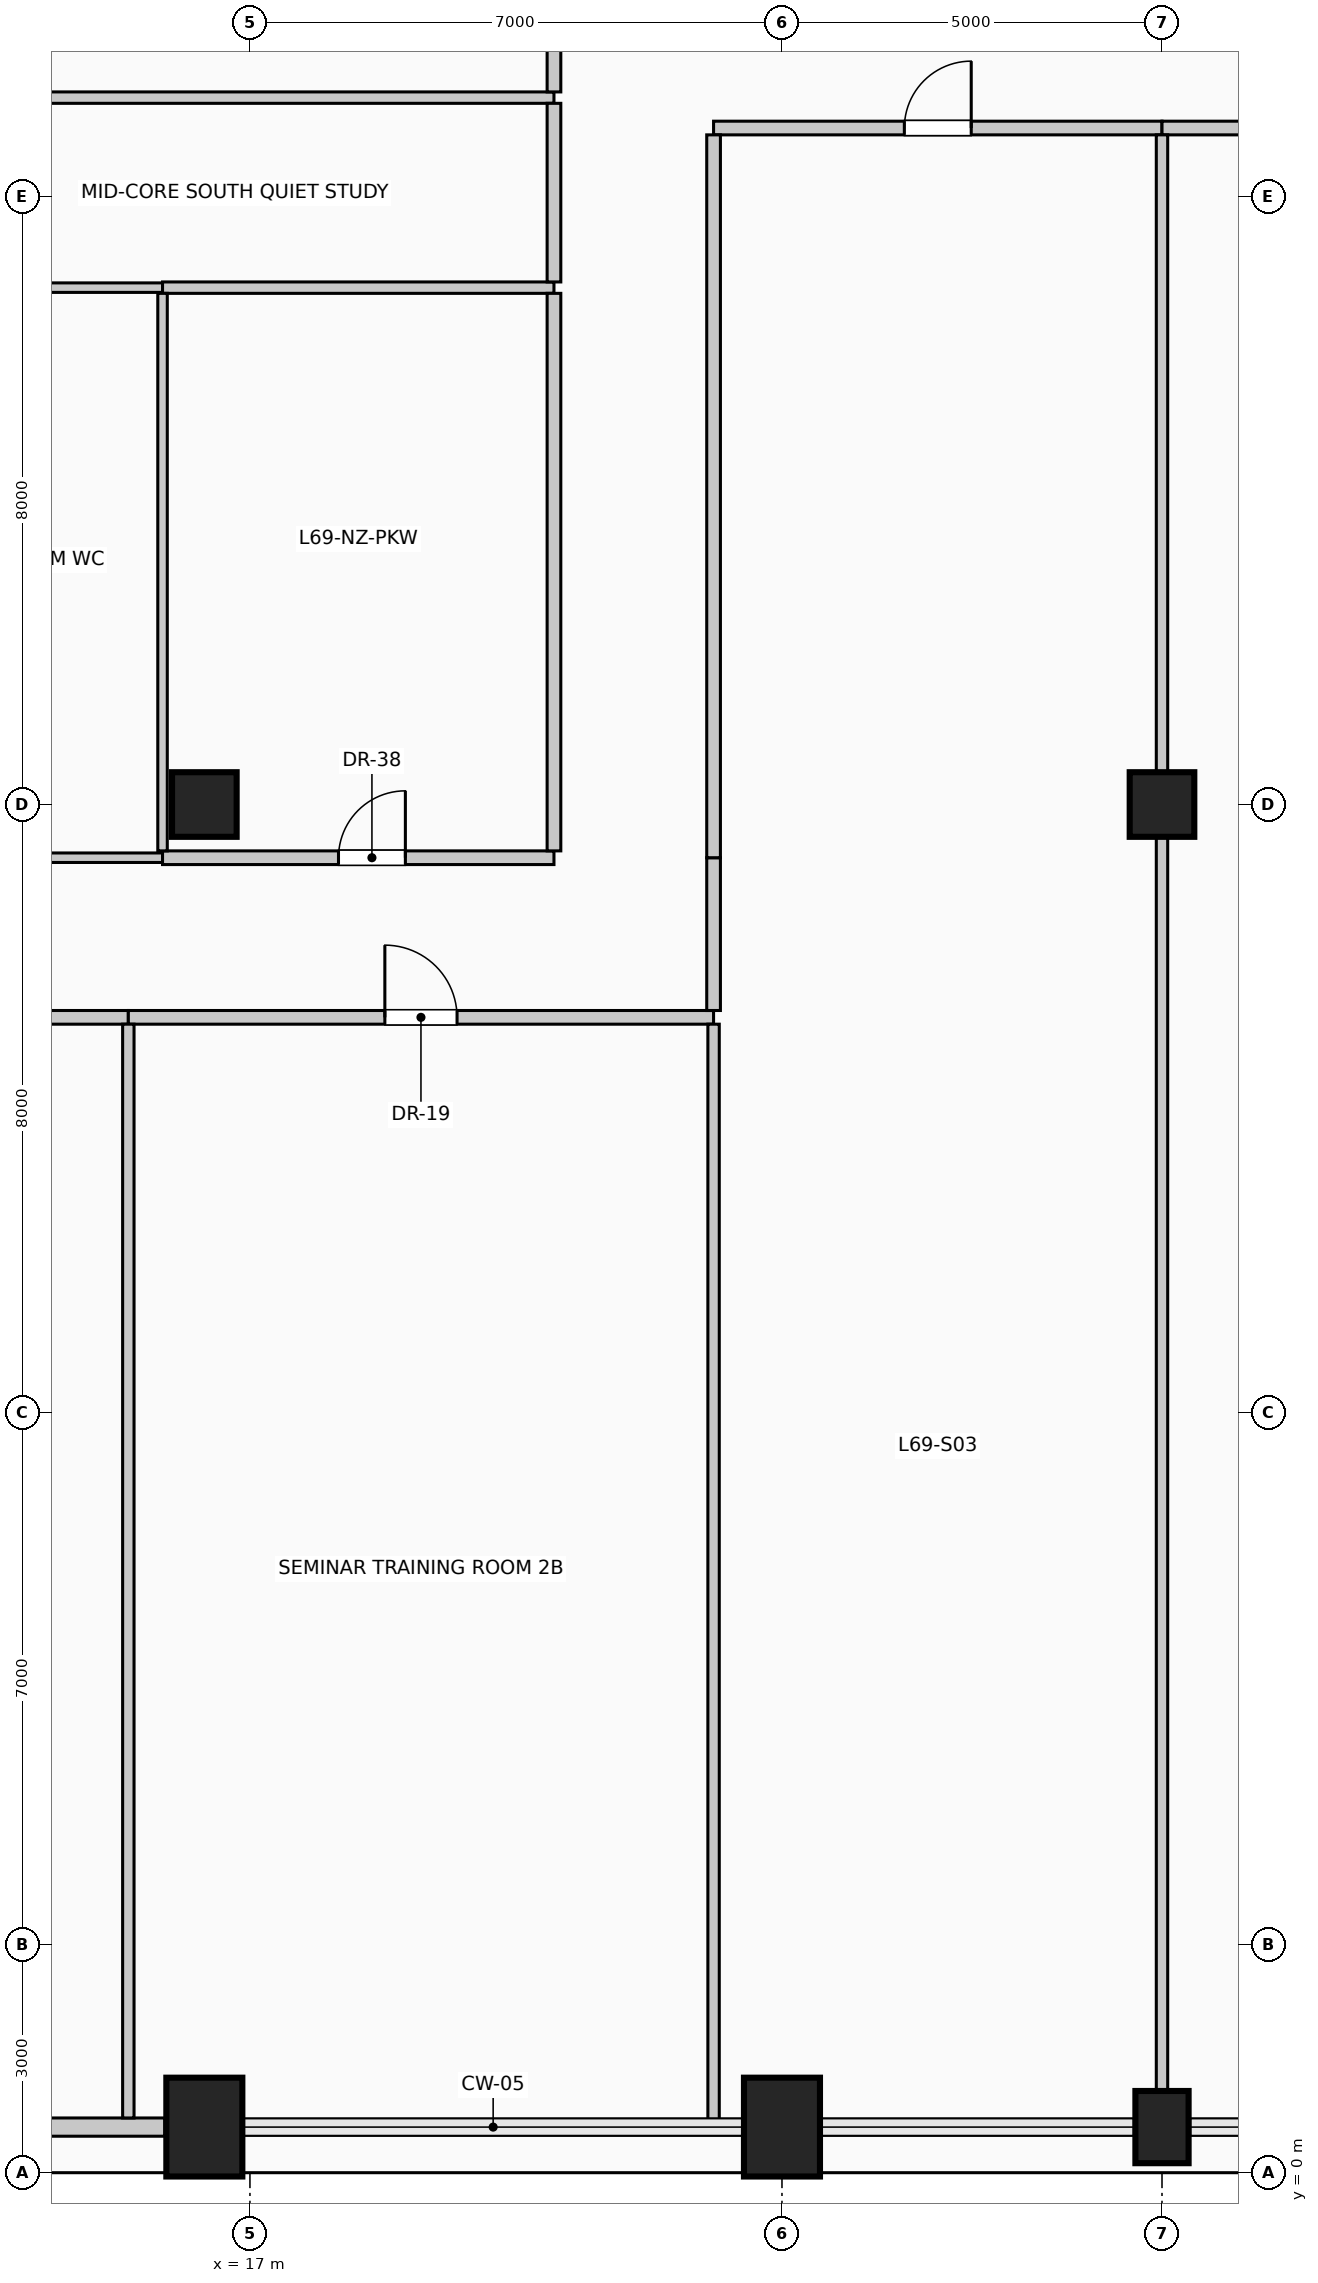
"""IFC4 building model, lengths in metres.
Left out: names, types, materials, properties, quantities, classifications, styles, units other than length and angle.
Written with IfcOpenShell. Run it as: python <this file> out.ifc"""

import sys

from ifc_helpers import new_model, si_unit, direction, frame, frame_2d, origin, origin_2d, place, context, subcontext, project, spatial, rectangle, circle, extrude, element, fill, save


model = new_model("IFC4")
c1 = context("Model", 3, precision=1e-05, world=origin(), true_north=direction((0.0, 1.0)))
c2 = subcontext(c1, "Body", "Model", "MODEL_VIEW")
j1 = project(units=[si_unit("LENGTHUNIT", "METRE"), si_unit("PLANEANGLEUNIT", "RADIAN")], contexts=[c1])
p1 = place(None, origin())
s1 = spatial("IfcSite", under=j1, at=p1, CompositionType="ELEMENT")
p2 = place(p1, origin())
s2 = spatial("IfcBuilding", under=s1, at=p2, CompositionType="ELEMENT")
p3 = place(p2, frame((0.0, 0.0, 285.0)))
s3 = spatial("IfcBuildingStorey", under=s2, at=p3, CompositionType="ELEMENT", Elevation=285.0)
for number, where, z_axis, x_axis in (
    (1, (16.4, 0.6, 0.0), (0.0, 0.0, 1.0), (1.0, 0.0, 0.0)),
    (2, (24.0, 0.6, 0.0), (0.0, 0.0, 1.0), (1.0, 0.0, 0.0)),
):
    element("IfcColumn", number, at=place(p3, frame(where, z_axis=z_axis, x_axis=x_axis)), inside=s3, PredefinedType="COLUMN", context=c2, shape_type="SweptSolid", body=[
        extrude(rectangle(XDim=1.0, YDim=1.3, at=origin_2d()), origin(), (0.0, 0.0, 1.0), 4.0),
    ])
p4 = place(p3, frame((29.0, 0.6, 0.0), z_axis=(0.0, 0.0, 1.0), x_axis=(1.0, 0.0, 0.0)))
e3 = element("IfcColumn", 3, at=p4, inside=s3, PredefinedType="COLUMN", context=c2, shape_type="SweptSolid", body=[
    extrude(rectangle(XDim=0.7, YDim=0.95, at=origin_2d()), origin(), (0.0, 0.0, 1.0), 4.0),
])
for number, where, z_axis, x_axis in (
    (4, (16.4, 18.0, 0.0), (0.0, 0.0, 1.0), (1.0, 0.0, 0.0)),
    (5, (29.0, 18.0, 0.0), (0.0, 0.0, 1.0), (1.0, 0.0, 0.0)),
):
    element("IfcColumn", number, at=place(p3, frame(where, z_axis=z_axis, x_axis=x_axis)), inside=s3, PredefinedType="COLUMN", context=c2, shape_type="SweptSolid", body=[
        extrude(circle(Radius=0.425, at=origin_2d()), origin(), (0.0, 0.0, 1.0), 4.0),
    ])
p5 = place(p3, frame((15.88, 0.6, 0.0), z_axis=(0.0, 0.0, 1.0), x_axis=(-1.0, 0.0, 0.0)))
e6 = element("IfcWall", 6, at=p5, inside=s3, PredefinedType="SOLIDWALL", context=c2, shape_type="SweptSolid", body=[
    extrude(rectangle(XDim=1.51, YDim=0.24, at=frame_2d((0.755, 0.0))), origin(), (0.0, 0.0, 1.0), 3.025),
])
p6 = place(p3, frame((8.84, 15.2, 0.0), z_axis=(0.0, 0.0, 1.0), x_axis=(1.0, 0.0, 0.0)))
e7 = element("IfcWall", 7, at=p6, inside=s3, PredefinedType="PARTITIONING", context=c2, shape_type="SweptSolid", body=[
    extrude(rectangle(XDim=6.56, YDim=0.18, at=frame_2d((3.28, 0.0))), origin(), (0.0, 0.0, 1.0), 3.775),
])
p7 = place(p6, frame((2.755, 0.0, 0.0)))
e8 = element("IfcOpeningElement", 8, at=p7, cuts=e7, PredefinedType="OPENING", context=c2, shape_type="SweptSolid", body=[
    extrude(rectangle(XDim=1.05, YDim=2.15, at=frame_2d((0.525, 1.075))), frame((0.0, 0.1, 0.0), z_axis=(0.0, -1.0, 0.0), x_axis=(1.0, 0.0, 0.0)), (0.0, 0.0, 1.0), 0.2),
])
p8 = place(p3, frame((15.4, 15.2, 0.0), z_axis=(0.0, 0.0, 1.0), x_axis=(1.0, 0.0, 0.0)))
e9 = element("IfcWall", 9, at=p8, inside=s3, PredefinedType="PARTITIONING", context=c2, shape_type="SweptSolid", body=[
    extrude(rectangle(XDim=7.7, YDim=0.18, at=frame_2d((3.85, 0.0))), origin(), (0.0, 0.0, 1.0), 3.775),
])
p9 = place(p8, frame((3.375, 0.0, 0.0)))
e10 = element("IfcOpeningElement", 10, at=p9, cuts=e9, PredefinedType="OPENING", context=c2, shape_type="SweptSolid", body=[
    extrude(rectangle(XDim=0.95, YDim=2.15, at=frame_2d((0.475, 1.075))), frame((0.0, 0.1, 0.0), z_axis=(0.0, -1.0, 0.0), x_axis=(1.0, 0.0, 0.0)), (0.0, 0.0, 1.0), 0.2),
])
p10 = place(p3, frame((9.8, 17.3, 0.0), z_axis=(0.0, 0.0, 1.0), x_axis=(1.0, 0.0, 0.0)))
e11 = element("IfcWall", 11, at=p10, inside=s3, PredefinedType="PARTITIONING", context=c2, shape_type="SweptSolid", body=[
    extrude(rectangle(XDim=6.05, YDim=0.125, at=frame_2d((3.025, 0.0))), origin(), (0.0, 0.0, 1.0), 3.775),
])
p11 = place(p10, frame((2.575, 0.0, 0.0)))
e12 = element("IfcOpeningElement", 12, at=p11, cuts=e11, PredefinedType="OPENING", context=c2, shape_type="SweptSolid", body=[
    extrude(rectangle(XDim=0.9, YDim=2.1, at=frame_2d((0.45, 1.05))), frame((0.0, 0.073, 0.0), z_axis=(0.0, -1.0, 0.0), x_axis=(1.0, 0.0, 0.0)), (0.0, 0.0, 1.0), 0.145),
])
p12 = place(p3, frame((15.85, 17.3, 0.0), z_axis=(0.0, 0.0, 1.0), x_axis=(1.0, 0.0, 0.0)))
e13 = element("IfcWall", 13, at=p12, inside=s3, PredefinedType="PARTITIONING", context=c2, shape_type="SweptSolid", body=[
    extrude(rectangle(XDim=5.15, YDim=0.18, at=frame_2d((2.575, 0.0))), origin(), (0.0, 0.0, 1.0), 3.775),
])
p13 = place(p12, frame((2.315, 0.0, 0.0)))
e14 = element("IfcOpeningElement", 14, at=p13, cuts=e13, PredefinedType="OPENING", context=c2, shape_type="SweptSolid", body=[
    extrude(rectangle(XDim=0.88, YDim=2.1, at=frame_2d((0.44, 1.05))), frame((0.0, 0.1, 0.0), z_axis=(0.0, -1.0, 0.0), x_axis=(1.0, 0.0, 0.0)), (0.0, 0.0, 1.0), 0.2),
])
p14 = place(p3, frame((12.2, 24.8, 0.0), z_axis=(0.0, 0.0, 1.0), x_axis=(1.0, 0.0, 0.0)))
e15 = element("IfcWall", 15, at=p14, inside=s3, PredefinedType="PARTITIONING", context=c2, shape_type="SweptSolid", body=[
    extrude(rectangle(XDim=3.65, YDim=0.125, at=frame_2d((1.825, 0.0))), origin(), (0.0, 0.0, 1.0), 3.775),
])
p15 = place(p3, frame((15.85, 24.8, 0.0), z_axis=(0.0, 0.0, 1.0), x_axis=(1.0, 0.0, 0.0)))
e16 = element("IfcWall", 16, at=p15, inside=s3, PredefinedType="PARTITIONING", context=c2, shape_type="SweptSolid", body=[
    extrude(rectangle(XDim=5.15, YDim=0.15, at=frame_2d((2.575, 0.0))), origin(), (0.0, 0.0, 1.0), 3.775),
])
p16 = place(p3, frame((23.1, 26.9, 0.0), z_axis=(0.0, 0.0, 1.0), x_axis=(1.0, 0.0, 0.0)))
e17 = element("IfcWall", 17, at=p16, inside=s3, PredefinedType="PARTITIONING", context=c2, shape_type="SweptSolid", body=[
    extrude(rectangle(XDim=5.9, YDim=0.18, at=frame_2d((2.95, 0.0))), origin(), (0.0, 0.0, 1.0), 3.775),
])
p17 = place(p16, frame((2.51, 0.0, 0.0)))
e18 = element("IfcOpeningElement", 18, at=p17, cuts=e17, PredefinedType="OPENING", context=c2, shape_type="SweptSolid", body=[
    extrude(rectangle(XDim=0.88, YDim=2.1, at=frame_2d((0.44, 1.05))), frame((0.0, 0.1, 0.0), z_axis=(0.0, -1.0, 0.0), x_axis=(1.0, 0.0, 0.0)), (0.0, 0.0, 1.0), 0.2),
])
p18 = place(p3, frame((29.0, 26.9, 0.0), z_axis=(0.0, 0.0, 1.0), x_axis=(1.0, 0.0, 0.0)))
e19 = element("IfcWall", 19, at=p18, inside=s3, PredefinedType="PARTITIONING", context=c2, shape_type="SweptSolid", body=[
    extrude(rectangle(XDim=12.6, YDim=0.18, at=frame_2d((6.3, 0.0))), origin(), (0.0, 0.0, 1.0), 3.775),
])
p19 = place(p18, frame((5.825, 0.0, 0.0)))
e20 = element("IfcOpeningElement", 20, at=p19, cuts=e19, PredefinedType="OPENING", context=c2, shape_type="SweptSolid", body=[
    extrude(rectangle(XDim=0.95, YDim=2.15, at=frame_2d((0.475, 1.075))), frame((0.0, 0.1, 0.0), z_axis=(0.0, -1.0, 0.0), x_axis=(1.0, 0.0, 0.0)), (0.0, 0.0, 1.0), 0.2),
])
p20 = place(p3, frame((12.2, 27.3, 0.0), z_axis=(0.0, 0.0, 1.0), x_axis=(1.0, 0.0, 0.0)))
e21 = element("IfcWall", 21, at=p20, inside=s3, PredefinedType="PARTITIONING", context=c2, shape_type="SweptSolid", body=[
    extrude(rectangle(XDim=8.8, YDim=0.15, at=frame_2d((4.4, 0.0))), origin(), (0.0, 0.0, 1.0), 3.775),
])
p21 = place(p3, frame((15.4, 0.72, 0.0), z_axis=(0.0, 0.0, 1.0), x_axis=(0.0, 1.0, 0.0)))
e22 = element("IfcWall", 22, at=p21, inside=s3, PredefinedType="PARTITIONING", context=c2, shape_type="SweptSolid", body=[
    extrude(rectangle(XDim=14.39, YDim=0.15, at=frame_2d((7.195, 0.0))), origin(), (0.0, 0.0, 1.0), 3.775),
])
p22 = place(p3, frame((15.85, 17.39, 0.0), z_axis=(0.0, 0.0, 1.0), x_axis=(0.0, 1.0, 0.0)))
e23 = element("IfcWall", 23, at=p22, inside=s3, PredefinedType="PARTITIONING", context=c2, shape_type="SweptSolid", body=[
    extrude(rectangle(XDim=7.335, YDim=0.125, at=frame_2d((3.667, 0.0))), origin(), (0.0, 0.0, 1.0), 3.775),
])
p23 = place(p3, frame((21.0, 17.39, 0.0), z_axis=(0.0, 0.0, 1.0), x_axis=(0.0, 1.0, 0.0)))
e24 = element("IfcWall", 24, at=p23, inside=s3, PredefinedType="PARTITIONING", context=c2, shape_type="SweptSolid", body=[
    extrude(rectangle(XDim=7.335, YDim=0.18, at=frame_2d((3.667, 0.0))), origin(), (0.0, 0.0, 1.0), 3.775),
])
p24 = place(p3, frame((21.0, 24.875, 0.0), z_axis=(0.0, 0.0, 1.0), x_axis=(0.0, 1.0, 0.0)))
e25 = element("IfcWall", 25, at=p24, inside=s3, PredefinedType="PARTITIONING", context=c2, shape_type="SweptSolid", body=[
    extrude(rectangle(XDim=2.35, YDim=0.18, at=frame_2d((1.175, 0.0))), origin(), (0.0, 0.0, 1.0), 3.775),
])
p25 = place(p3, frame((21.0, 27.375, 0.0), z_axis=(0.0, 0.0, 1.0), x_axis=(0.0, 1.0, 0.0)))
e26 = element("IfcWall", 26, at=p25, inside=s3, PredefinedType="PARTITIONING", context=c2, shape_type="SweptSolid", body=[
    extrude(rectangle(XDim=2.4, YDim=0.18, at=frame_2d((1.2, 0.0))), origin(), (0.0, 0.0, 1.0), 3.775),
])
p26 = place(p25, frame((0.725, 0.0, 0.0)))
e27 = element("IfcOpeningElement", 27, at=p26, cuts=e26, PredefinedType="OPENING", context=c2, shape_type="SweptSolid", body=[
    extrude(rectangle(XDim=0.95, YDim=2.15, at=frame_2d((0.475, 1.075))), frame((0.0, 0.1, 0.0), z_axis=(0.0, -1.0, 0.0), x_axis=(1.0, 0.0, 0.0)), (0.0, 0.0, 1.0), 0.2),
])
p27 = place(p3, frame((23.1, 0.6, 0.0), z_axis=(0.0, 0.0, 1.0), x_axis=(0.0, 1.0, 0.0)))
e28 = element("IfcWall", 28, at=p27, inside=s3, PredefinedType="PARTITIONING", context=c2, shape_type="SweptSolid", body=[
    extrude(rectangle(XDim=14.51, YDim=0.15, at=frame_2d((7.255, 0.0))), origin(), (0.0, 0.0, 1.0), 3.775),
])
p28 = place(p3, frame((23.1, 15.29, 0.0), z_axis=(0.0, 0.0, 1.0), x_axis=(0.0, 1.0, 0.0)))
e29 = element("IfcWall", 29, at=p28, inside=s3, PredefinedType="PARTITIONING", context=c2, shape_type="SweptSolid", body=[
    extrude(rectangle(XDim=2.01, YDim=0.18, at=frame_2d((1.005, 0.0))), origin(), (0.0, 0.0, 1.0), 3.775),
])
p29 = place(p3, frame((23.1, 17.3, 0.0), z_axis=(0.0, 0.0, 1.0), x_axis=(0.0, 1.0, 0.0)))
e30 = element("IfcWall", 30, at=p29, inside=s3, PredefinedType="PARTITIONING", context=c2, shape_type="SweptSolid", body=[
    extrude(rectangle(XDim=9.51, YDim=0.18, at=frame_2d((4.755, 0.0))), origin(), (0.0, 0.0, 1.0), 3.775),
])
p30 = place(p3, frame((29.0, 1.075, 0.0), z_axis=(0.0, 0.0, 1.0), x_axis=(0.0, 1.0, 0.0)))
e31 = element("IfcWall", 31, at=p30, inside=s3, PredefinedType="PARTITIONING", context=c2, shape_type="SweptSolid", body=[
    extrude(rectangle(XDim=16.5, YDim=0.15, at=frame_2d((8.25, 0.0))), origin(), (0.0, 0.0, 1.0), 3.22),
])
p31 = place(p3, frame((29.0, 18.425, 0.0), z_axis=(0.0, 0.0, 1.0), x_axis=(0.0, 1.0, 0.0)))
e32 = element("IfcWall", 32, at=p31, inside=s3, PredefinedType="PARTITIONING", context=c2, shape_type="SweptSolid", body=[
    extrude(rectangle(XDim=8.385, YDim=0.15, at=frame_2d((4.192, 0.0))), origin(), (0.0, 0.0, 1.0), 3.22),
])
p32 = place(p9, origin())
e33 = element("IfcDoor", 33, at=p32, inside=s3, OperationType="SINGLE_SWING_LEFT", PredefinedType="DOOR", context=c2, shape_type="SweptSolid", body=[
    extrude(rectangle(XDim=0.95, YDim=2.15, at=frame_2d((0.475, 1.075))), frame((0.0, 0.025, 0.0), z_axis=(0.0, -1.0, 0.0), x_axis=(1.0, 0.0, 0.0)), (0.0, 0.0, 1.0), 0.05),
])
fill(e10, e33)
p33 = place(p13, origin())
e34 = element("IfcDoor", 34, at=p33, inside=s3, OperationType="SINGLE_SWING_RIGHT", PredefinedType="DOOR", context=c2, shape_type="SweptSolid", body=[
    extrude(rectangle(XDim=0.88, YDim=2.1, at=frame_2d((0.44, 1.05))), frame((0.0, 0.025, 0.0), z_axis=(0.0, -1.0, 0.0), x_axis=(1.0, 0.0, 0.0)), (0.0, 0.0, 1.0), 0.05),
])
fill(e14, e34)
p34 = place(p17, origin())
e35 = element("IfcDoor", 35, at=p34, inside=s3, OperationType="SINGLE_SWING_RIGHT", PredefinedType="DOOR", context=c2, shape_type="SweptSolid", body=[
    extrude(rectangle(XDim=0.88, YDim=2.1, at=frame_2d((0.44, 1.05))), frame((0.0, 0.025, 0.0), z_axis=(0.0, -1.0, 0.0), x_axis=(1.0, 0.0, 0.0)), (0.0, 0.0, 1.0), 0.05),
])
fill(e18, e35)
save(model, sys.argv[1])
